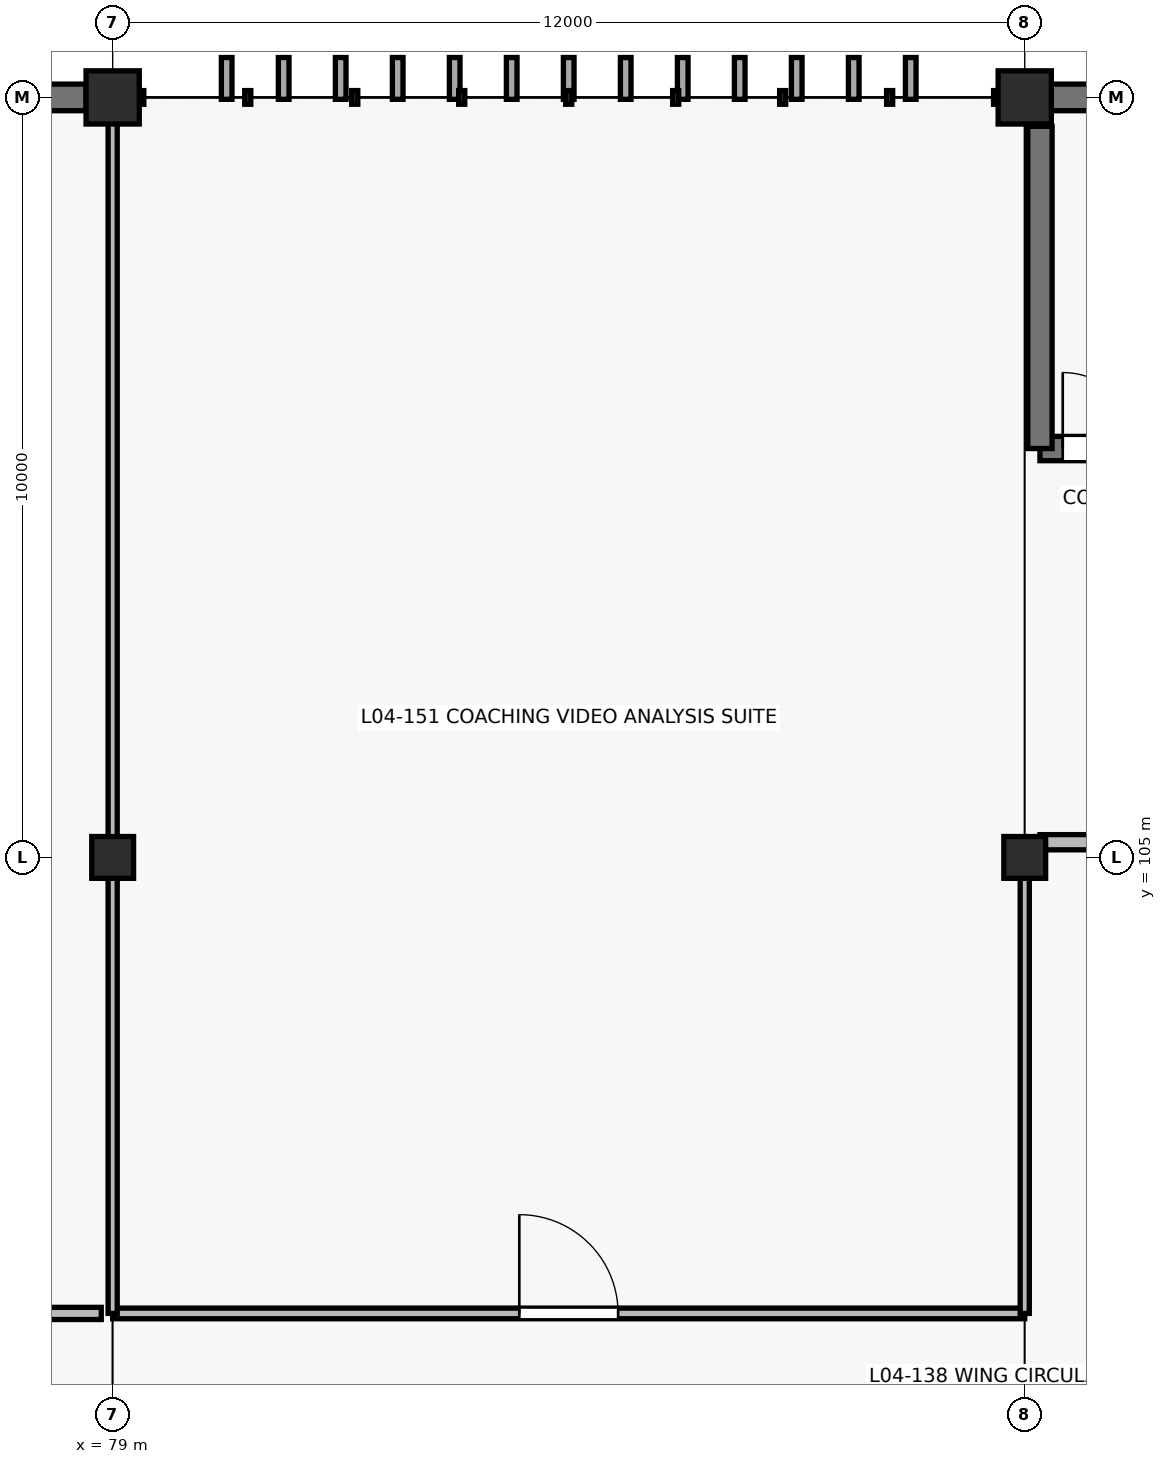
"""IFC4 building model, lengths in metres.
Left out: names, types, materials, properties, quantities, classifications, styles, units other than length and angle.
Written with IfcOpenShell. Run it as: python <this file> out.ifc"""

import sys

from ifc_helpers import new_model, si_unit, direction, frame, frame_2d, origin, origin_2d, place, context, subcontext, project, spatial, rectangle, circle, extrude, element, fill, save


model = new_model("IFC4")
c1 = context("Model", 3, precision=1e-05, world=origin(), true_north=direction((0.0, 1.0)))
c2 = subcontext(c1, "Body", "Model", "MODEL_VIEW")
j1 = project(units=[si_unit("LENGTHUNIT", "METRE"), si_unit("PLANEANGLEUNIT", "RADIAN")], contexts=[c1])
p1 = place(None, origin())
s1 = spatial("IfcSite", under=j1, at=p1, CompositionType="ELEMENT")
p2 = place(p1, origin())
s2 = spatial("IfcBuilding", under=s1, at=p2, CompositionType="ELEMENT")
p3 = place(p2, frame((0.0, 0.0, 17.4)))
s3 = spatial("IfcBuildingStorey", under=s2, at=p3, CompositionType="ELEMENT", Elevation=17.4)
p4 = place(p3, frame((79.0, 105.0, 0.0), z_axis=(0.0, 0.0, 1.0), x_axis=(1.0, 0.0, 0.0)))
e1 = element("IfcColumn", 1, at=p4, inside=s3, PredefinedType="COLUMN", context=c2, shape_type="SweptSolid", body=[
    extrude(rectangle(XDim=0.55, YDim=0.55, at=origin_2d()), origin(), (0.0, 0.0, 1.0), 4.2),
])
p5 = place(p3, frame((79.0, 115.0, 0.0), z_axis=(0.0, 0.0, 1.0), x_axis=(1.0, 0.0, 0.0)))
e2 = element("IfcColumn", 2, at=p5, inside=s3, PredefinedType="COLUMN", context=c2, shape_type="SweptSolid", body=[
    extrude(circle(Radius=0.35, at=origin_2d()), origin(), (0.0, 0.0, 1.0), 4.2),
])
p6 = place(p3, frame((91.0, 105.0, 0.0), z_axis=(0.0, 0.0, 1.0), x_axis=(1.0, 0.0, 0.0)))
e3 = element("IfcColumn", 3, at=p6, inside=s3, PredefinedType="COLUMN", context=c2, shape_type="SweptSolid", body=[
    extrude(rectangle(XDim=0.55, YDim=0.55, at=origin_2d()), origin(), (0.0, 0.0, 1.0), 4.2),
])
p7 = place(p3, frame((91.0, 115.0, 0.0), z_axis=(0.0, 0.0, 1.0), x_axis=(1.0, 0.0, 0.0)))
e4 = element("IfcColumn", 4, at=p7, inside=s3, PredefinedType="COLUMN", context=c2, shape_type="SweptSolid", body=[
    extrude(circle(Radius=0.35, at=origin_2d()), origin(), (0.0, 0.0, 1.0), 4.2),
])
p8 = place(p3, frame((67.35, 115.0, 0.0), z_axis=(0.0, 0.0, 1.0), x_axis=(1.0, 0.0, 0.0)))
e5 = element("IfcWall", 5, at=p8, inside=s3, PredefinedType="SOLIDWALL", context=c2, shape_type="SweptSolid", body=[
    extrude(rectangle(XDim=11.3, YDim=0.35, at=frame_2d((5.65, 0.0))), origin(), (0.0, 0.0, 1.0), 4.2),
])
p9 = place(p8, frame((2.2, 0.0, 1.0)))
e6 = element("IfcOpeningElement", 6, at=p9, cuts=e5, PredefinedType="OPENING", context=c2, shape_type="SweptSolid", body=[
    extrude(rectangle(XDim=1.8, YDim=1.5, at=frame_2d((0.9, 0.75))), frame((0.0, 0.185, 0.0), z_axis=(0.0, -1.0, 0.0), x_axis=(1.0, 0.0, 0.0)), (0.0, 0.0, 1.0), 0.37),
])
p10 = place(p3, frame((91.35, 115.0, 0.0), z_axis=(0.0, 0.0, 1.0), x_axis=(1.0, 0.0, 0.0)))
e7 = element("IfcWall", 7, at=p10, inside=s3, PredefinedType="SOLIDWALL", context=c2, shape_type="SweptSolid", body=[
    extrude(rectangle(XDim=9.3, YDim=0.35, at=frame_2d((4.65, 0.0))), origin(), (0.0, 0.0, 1.0), 4.2),
])
p11 = place(p10, frame((2.2, 0.0, 1.0)))
e8 = element("IfcOpeningElement", 8, at=p11, cuts=e7, PredefinedType="OPENING", context=c2, shape_type="SweptSolid", body=[
    extrude(rectangle(XDim=2.4, YDim=1.5, at=frame_2d((1.2, 0.75))), frame((0.0, 0.185, 0.0), z_axis=(0.0, -1.0, 0.0), x_axis=(1.0, 0.0, 0.0)), (0.0, 0.0, 1.0), 0.37),
])
p12 = place(p3, frame((74.8, 99.0, 0.0), z_axis=(0.0, 0.0, 1.0), x_axis=(1.0, 0.0, 0.0)))
e9 = element("IfcWall", 9, at=p12, inside=s3, PredefinedType="PARTITIONING", context=c2, shape_type="SweptSolid", body=[
    extrude(rectangle(XDim=4.05, YDim=0.16, at=frame_2d((2.025, 0.0))), origin(), (0.0, 0.0, 1.0), 2.975),
])
p13 = place(p12, frame((0.45, 0.0, 0.0)))
e10 = element("IfcOpeningElement", 10, at=p13, cuts=e9, PredefinedType="OPENING", context=c2, shape_type="SweptSolid", body=[
    extrude(rectangle(XDim=1.0, YDim=2.15, at=frame_2d((0.5, 1.075))), frame((0.0, 0.09, 0.0), z_axis=(0.0, -1.0, 0.0), x_axis=(1.0, 0.0, 0.0)), (0.0, 0.0, 1.0), 0.18),
])
p14 = place(p3, frame((91.2, 110.38, 0.0), z_axis=(0.0, 0.0, 1.0), x_axis=(1.0, 0.0, 0.0)))
e11 = element("IfcWall", 11, at=p14, inside=s3, PredefinedType="SHEAR", context=c2, shape_type="SweptSolid", body=[
    extrude(rectangle(XDim=7.1, YDim=0.32, at=frame_2d((3.55, 0.0))), origin(), (0.0, 0.0, 1.0), 4.2),
])
p15 = place(p14, frame((0.3, 0.0, 0.0)))
e12 = element("IfcOpeningElement", 12, at=p15, cuts=e11, PredefinedType="OPENING", context=c2, shape_type="SweptSolid", body=[
    extrude(rectangle(XDim=1.0, YDim=2.15, at=frame_2d((0.5, 1.075))), frame((0.0, 0.17, 0.0), z_axis=(0.0, -1.0, 0.0), x_axis=(1.0, 0.0, 0.0)), (0.0, 0.0, 1.0), 0.34),
])
p16 = place(p3, frame((91.2, 114.62, 0.0), z_axis=(0.0, 0.0, 1.0), x_axis=(0.0, -1.0, 0.0)))
e13 = element("IfcWall", 13, at=p16, inside=s3, PredefinedType="SHEAR", context=c2, shape_type="SweptSolid", body=[
    extrude(rectangle(XDim=4.24, YDim=0.32, at=frame_2d((2.12, 0.0))), origin(), (0.0, 0.0, 1.0), 4.2),
])
p17 = place(p3, frame((91.2, 105.2, 0.0), z_axis=(0.0, 0.0, 1.0), x_axis=(1.0, 0.0, 0.0)))
e14 = element("IfcWall", 14, at=p17, inside=s3, PredefinedType="PARTITIONING", context=c2, shape_type="SweptSolid", body=[
    extrude(rectangle(XDim=7.1, YDim=0.2, at=frame_2d((3.55, 0.0))), origin(), (0.0, 0.0, 1.0), 2.975),
])
p18 = place(p17, frame((2.2, 0.0, 0.0)))
e15 = element("IfcOpeningElement", 15, at=p18, cuts=e14, PredefinedType="OPENING", context=c2, shape_type="SweptSolid", body=[
    extrude(rectangle(XDim=1.6, YDim=2.2, at=frame_2d((0.8, 1.1))), frame((0.0, 0.11, 0.0), z_axis=(0.0, -1.0, 0.0), x_axis=(1.0, 0.0, 0.0)), (0.0, 0.0, 1.0), 0.22),
])
p19 = place(p3, frame((79.0, 99.0, 0.0), z_axis=(0.0, 0.0, 1.0), x_axis=(1.0, 0.0, 0.0)))
e16 = element("IfcWall", 16, at=p19, inside=s3, PredefinedType="PARTITIONING", context=c2, shape_type="SweptSolid", body=[
    extrude(rectangle(XDim=12.0, YDim=0.14, at=frame_2d((6.0, 0.0))), origin(), (0.0, 0.0, 1.0), 2.975),
])
p20 = place(p19, frame((5.35, 0.0, 0.0)))
e17 = element("IfcOpeningElement", 17, at=p20, cuts=e16, PredefinedType="OPENING", context=c2, shape_type="SweptSolid", body=[
    extrude(rectangle(XDim=1.3, YDim=2.2, at=frame_2d((0.65, 1.1))), frame((0.0, 0.08, 0.0), z_axis=(0.0, -1.0, 0.0), x_axis=(1.0, 0.0, 0.0)), (0.0, 0.0, 1.0), 0.16),
])
p21 = place(p3, frame((79.0, 99.0, 0.0), z_axis=(0.0, 0.0, 1.0), x_axis=(0.0, 1.0, 0.0)))
e18 = element("IfcWall", 18, at=p21, inside=s3, PredefinedType="PARTITIONING", context=c2, shape_type="SweptSolid", body=[
    extrude(rectangle(XDim=15.75, YDim=0.12, at=frame_2d((7.875, 0.0))), origin(), (0.0, 0.0, 1.0), 2.975),
])
p22 = place(p3, frame((91.0, 99.0, 0.0), z_axis=(0.0, 0.0, 1.0), x_axis=(0.0, 1.0, 0.0)))
e19 = element("IfcWall", 19, at=p22, inside=s3, PredefinedType="PARTITIONING", context=c2, shape_type="SweptSolid", body=[
    extrude(rectangle(XDim=6.2, YDim=0.12, at=frame_2d((3.1, 0.0))), origin(), (0.0, 0.0, 1.0), 2.975),
])
p23 = place(p15, origin())
e20 = element("IfcDoor", 20, at=p23, inside=s3, OperationType="SINGLE_SWING_LEFT", PredefinedType="DOOR", context=c2, shape_type="SweptSolid", body=[
    extrude(rectangle(XDim=1.0, YDim=2.15, at=frame_2d((0.5, 1.075))), frame((0.0, 0.025, 0.0), z_axis=(0.0, -1.0, 0.0), x_axis=(1.0, 0.0, 0.0)), (0.0, 0.0, 1.0), 0.05),
])
fill(e12, e20)
p24 = place(p20, origin())
e21 = element("IfcDoor", 21, at=p24, inside=s3, OperationType="SINGLE_SWING_LEFT", PredefinedType="DOOR", context=c2, shape_type="SweptSolid", body=[
    extrude(rectangle(XDim=1.3, YDim=2.2, at=frame_2d((0.65, 1.1))), frame((0.0, 0.025, 0.0), z_axis=(0.0, -1.0, 0.0), x_axis=(1.0, 0.0, 0.0)), (0.0, 0.0, 1.0), 0.05),
])
fill(e17, e21)
save(model, sys.argv[1])
